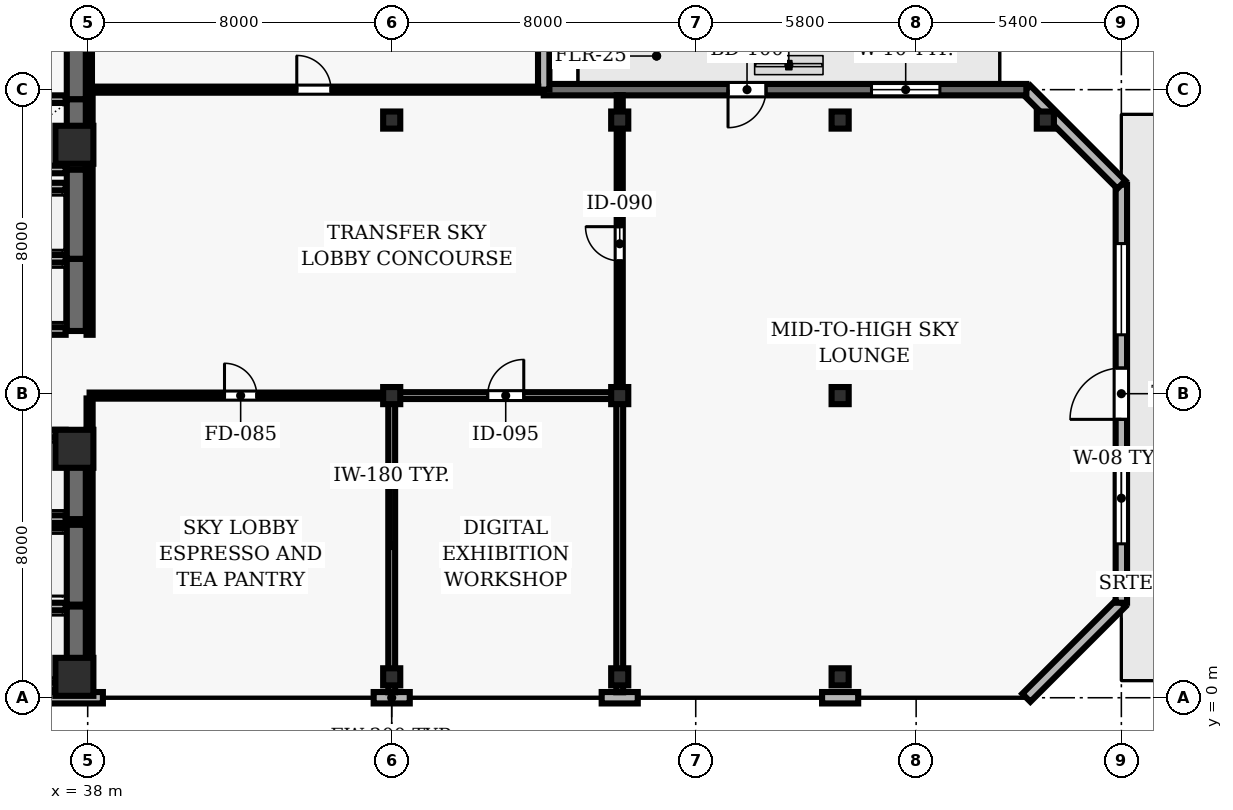
"""IFC4 building model, lengths in metres.
Left out: names, types, materials, properties, quantities, classifications, styles, units other than length and angle.
Written with IfcOpenShell. Run it as: python <this file> out.ifc"""

import sys

from ifc_helpers import new_model, si_unit, direction, frame, frame_2d, origin, origin_2d, place, context, subcontext, project, spatial, rectangle, hollow_rectangle, extrude, element, fill, save


model = new_model("IFC4")
c1 = context("Model", 3, precision=1e-05, world=origin(), true_north=direction((0.0, 1.0)))
c2 = subcontext(c1, "Body", "Model", "MODEL_VIEW")
j1 = project(units=[si_unit("LENGTHUNIT", "METRE"), si_unit("PLANEANGLEUNIT", "RADIAN")], contexts=[c1])
p1 = place(None, origin())
s1 = spatial("IfcSite", under=j1, at=p1, CompositionType="ELEMENT")
p2 = place(p1, origin())
s2 = spatial("IfcBuilding", under=s1, at=p2, CompositionType="ELEMENT")
p3 = place(p2, frame((0.0, 0.0, 170.8)))
s3 = spatial("IfcBuildingStorey", under=s2, at=p3, CompositionType="ELEMENT", Elevation=170.8)
for number, where, z_axis, x_axis in (
    (1, (37.65, 0.55, 0.0), (0.0, 0.0, 1.0), (1.0, 0.0, 0.0)),
    (2, (37.65, 6.55, 0.0), (0.0, 0.0, 1.0), (1.0, 0.0, 0.0)),
    (3, (37.65, 14.55, 0.0), (0.0, 0.0, 1.0), (1.0, 0.0, 0.0)),
):
    element("IfcColumn", number, at=place(p3, frame(where, z_axis=z_axis, x_axis=x_axis)), inside=s3, PredefinedType="COLUMN", context=c2, shape_type="SweptSolid", body=[
        extrude(rectangle(XDim=1.0, YDim=1.0, at=origin_2d()), origin(), (0.0, 0.0, 1.0), 5.0),
    ])
for number, where, z_axis, x_axis in (
    (4, (46.0, 0.55, 0.0), (0.0, 0.0, 1.0), (1.0, 0.0, 0.0)),
    (5, (46.0, 7.95, 0.0), (0.0, 0.0, 1.0), (1.0, 0.0, 0.0)),
    (6, (46.0, 15.2, 0.0), (0.0, 0.0, 1.0), (1.0, 0.0, 0.0)),
    (7, (52.0, 0.55, 0.0), (0.0, 0.0, 1.0), (1.0, 0.0, 0.0)),
    (8, (52.0, 7.95, 0.0), (0.0, 0.0, 1.0), (1.0, 0.0, 0.0)),
    (9, (52.0, 15.2, 0.0), (0.0, 0.0, 1.0), (1.0, 0.0, 0.0)),
    (10, (57.8, 0.55, 0.0), (0.0, 0.0, 1.0), (1.0, 0.0, 0.0)),
    (11, (57.8, 7.95, 0.0), (0.0, 0.0, 1.0), (1.0, 0.0, 0.0)),
    (12, (57.8, 15.2, 0.0), (0.0, 0.0, 1.0), (1.0, 0.0, 0.0)),
    (13, (63.2, 15.2, 0.0), (0.0, 0.0, 1.0), (1.0, 0.0, 0.0)),
):
    element("IfcColumn", number, at=place(p3, frame(where, z_axis=z_axis, x_axis=x_axis)), inside=s3, PredefinedType="COLUMN", context=c2, shape_type="SweptSolid", body=[
        extrude(hollow_rectangle(XDim=0.45, YDim=0.45, WallThickness=0.02, at=origin_2d()), origin(), (0.0, 0.0, 1.0), 5.0),
    ])
p4 = place(p3, frame((31.0, 0.0, 0.0), z_axis=(0.0, 0.0, 1.0), x_axis=(1.0, 0.0, 0.0)))
e14 = element("IfcWall", 14, at=p4, inside=s3, PredefinedType="SOLIDWALL", context=c2, shape_type="SweptSolid", body=[
    extrude(rectangle(XDim=7.4, YDim=0.3, at=frame_2d((3.7, 0.0))), origin(), (0.0, 0.0, 1.0), 4.79),
])
for number, where, z_axis, x_axis in (
    (15, (45.525, 0.0, 0.0), (0.0, 0.0, 1.0), (1.0, 0.0, 0.0)),
    (16, (51.525, 0.0, 0.0), (0.0, 0.0, 1.0), (1.0, 0.0, 0.0)),
):
    element("IfcWall", number, at=place(p3, frame(where, z_axis=z_axis, x_axis=x_axis)), inside=s3, PredefinedType="SOLIDWALL", context=c2, shape_type="SweptSolid", body=[
        extrude(rectangle(XDim=0.95, YDim=0.3, at=frame_2d((0.475, 0.0))), origin(), (0.0, 0.0, 1.0), 4.79),
    ])
p5 = place(p3, frame((57.325, 0.0, 0.0), z_axis=(0.0, 0.0, 1.0), x_axis=(1.0, 0.0, 0.0)))
e17 = element("IfcWall", 17, at=p5, inside=s3, PredefinedType="SOLIDWALL", context=c2, shape_type="SweptSolid", body=[
    extrude(rectangle(XDim=0.95, YDim=0.3, at=frame_2d((0.475, 0.0))), origin(), (0.0, 0.0, 1.0), 4.79),
])
p6 = place(p3, frame((62.7, 0.0, 0.0), z_axis=(0.0, 0.0, 1.0), x_axis=(0.707106781187, 0.707106781187, 0.0)))
e18 = element("IfcWall", 18, at=p6, inside=s3, PredefinedType="SOLIDWALL", context=c2, shape_type="SweptSolid", body=[
    extrude(rectangle(XDim=3.536, YDim=0.3, at=frame_2d((1.768, 0.0))), origin(), (0.0, 0.0, 1.0), 4.79),
])
p7 = place(p3, frame((65.2, 2.5, 0.0), z_axis=(0.0, 0.0, 1.0), x_axis=(0.0, 1.0, 0.0)))
e19 = element("IfcWall", 19, at=p7, inside=s3, PredefinedType="SOLIDWALL", context=c2, shape_type="SweptSolid", body=[
    extrude(rectangle(XDim=11.0, YDim=0.3, at=frame_2d((5.5, 0.0))), origin(), (0.0, 0.0, 1.0), 4.79),
])
p8 = place(p7, frame((4.825, 0.0, 0.0)))
e20 = element("IfcOpeningElement", 20, at=p8, cuts=e19, PredefinedType="OPENING", context=c2, shape_type="SweptSolid", body=[
    extrude(rectangle(XDim=1.35, YDim=2.2, at=frame_2d((0.675, 1.1))), frame((0.0, 0.16, 0.0), z_axis=(0.0, -1.0, 0.0), x_axis=(1.0, 0.0, 0.0)), (0.0, 0.0, 1.0), 0.32),
])
p9 = place(p7, frame((1.55, 0.0, 0.9)))
e21 = element("IfcOpeningElement", 21, at=p9, cuts=e19, PredefinedType="OPENING", context=c2, shape_type="SweptSolid", body=[
    extrude(rectangle(XDim=2.4, YDim=1.8, at=frame_2d((1.2, 0.9))), frame((0.0, 0.16, 0.0), z_axis=(0.0, -1.0, 0.0), x_axis=(1.0, 0.0, 0.0)), (0.0, 0.0, 1.0), 0.32),
])
p10 = place(p7, frame((7.05, 0.0, 0.9)))
e22 = element("IfcOpeningElement", 22, at=p10, cuts=e19, PredefinedType="OPENING", context=c2, shape_type="SweptSolid", body=[
    extrude(rectangle(XDim=2.4, YDim=1.8, at=frame_2d((1.2, 0.9))), frame((0.0, 0.16, 0.0), z_axis=(0.0, -1.0, 0.0), x_axis=(1.0, 0.0, 0.0)), (0.0, 0.0, 1.0), 0.32),
])
p11 = place(p3, frame((65.2, 13.5, 0.0), z_axis=(0.0, 0.0, 1.0), x_axis=(-0.707106781187, 0.707106781187, 0.0)))
e23 = element("IfcWall", 23, at=p11, inside=s3, PredefinedType="SOLIDWALL", context=c2, shape_type="SweptSolid", body=[
    extrude(rectangle(XDim=3.536, YDim=0.3, at=frame_2d((1.768, 0.0))), origin(), (0.0, 0.0, 1.0), 4.79),
])
p12 = place(p3, frame((62.7, 16.0, 0.0), z_axis=(0.0, 0.0, 1.0), x_axis=(-1.0, 0.0, 0.0)))
e24 = element("IfcWall", 24, at=p12, inside=s3, PredefinedType="SOLIDWALL", context=c2, shape_type="SweptSolid", body=[
    extrude(rectangle(XDim=12.7, YDim=0.3, at=frame_2d((6.35, 0.0))), origin(), (0.0, 0.0, 1.0), 4.79),
])
p13 = place(p12, frame((6.85, 0.0, 0.0)))
e25 = element("IfcOpeningElement", 25, at=p13, cuts=e24, PredefinedType="OPENING", context=c2, shape_type="SweptSolid", body=[
    extrude(rectangle(XDim=1.0, YDim=2.2, at=frame_2d((0.5, 1.1))), frame((0.0, 0.16, 0.0), z_axis=(0.0, -1.0, 0.0), x_axis=(1.0, 0.0, 0.0)), (0.0, 0.0, 1.0), 0.32),
])
p14 = place(p12, frame((2.275, 0.0, 0.9)))
e26 = element("IfcOpeningElement", 26, at=p14, cuts=e24, PredefinedType="OPENING", context=c2, shape_type="SweptSolid", body=[
    extrude(rectangle(XDim=1.8, YDim=2.2, at=frame_2d((0.9, 1.1))), frame((0.0, 0.16, 0.0), z_axis=(0.0, -1.0, 0.0), x_axis=(1.0, 0.0, 0.0)), (0.0, 0.0, 1.0), 0.32),
])
p15 = place(p3, frame((50.0, 16.0, 0.0), z_axis=(0.0, 0.0, 1.0), x_axis=(0.0, 1.0, 0.0)))
e27 = element("IfcWall", 27, at=p15, inside=s3, PredefinedType="SOLIDWALL", context=c2, shape_type="SweptSolid", body=[
    extrude(rectangle(XDim=7.8, YDim=0.3, at=frame_2d((3.9, 0.0))), origin(), (0.0, 0.0, 1.0), 4.79),
])
p16 = place(p15, frame((2.7, 0.0, 0.9)))
e28 = element("IfcOpeningElement", 28, at=p16, cuts=e27, PredefinedType="OPENING", context=c2, shape_type="SweptSolid", body=[
    extrude(rectangle(XDim=2.4, YDim=2.2, at=frame_2d((1.2, 1.1))), frame((0.0, 0.16, 0.0), z_axis=(0.0, -1.0, 0.0), x_axis=(1.0, 0.0, 0.0)), (0.0, 0.0, 1.0), 0.32),
])
p17 = place(p3, frame((37.7, 0.3, 0.0), z_axis=(0.0, 0.0, 1.0), x_axis=(0.0, 1.0, 0.0)))
e29 = element("IfcWall", 29, at=p17, inside=s3, PredefinedType="SHEAR", context=c2, shape_type="SweptSolid", body=[
    extrude(rectangle(XDim=2.1, YDim=0.5, at=frame_2d((1.05, 0.0))), origin(), (0.0, 0.0, 1.0), 4.79),
])
for number, where, z_axis, x_axis in (
    (30, (35.28, 0.3, 0.0), (0.0, 0.0, 1.0), (1.0, 0.0, 0.0)),
    (31, (37.42, 2.4, 0.0), (0.0, 0.0, 1.0), (-1.0, 0.0, 0.0)),
):
    element("IfcWall", number, at=place(p3, frame(where, z_axis=z_axis, x_axis=x_axis)), inside=s3, PredefinedType="SOLIDWALL", context=c2, shape_type="SweptSolid", body=[
        extrude(rectangle(XDim=2.14, YDim=0.2, at=frame_2d((1.07, 0.0))), origin(), (0.0, 0.0, 1.0), 4.79),
    ])
p18 = place(p3, frame((37.7, 2.45, 0.0), z_axis=(0.0, 0.0, 1.0), x_axis=(0.0, 1.0, 0.0)))
e32 = element("IfcWall", 32, at=p18, inside=s3, PredefinedType="SHEAR", context=c2, shape_type="SweptSolid", body=[
    extrude(rectangle(XDim=2.1, YDim=0.5, at=frame_2d((1.05, 0.0))), origin(), (0.0, 0.0, 1.0), 4.79),
])
p19 = place(p3, frame((37.42, 4.55, 0.0), z_axis=(0.0, 0.0, 1.0), x_axis=(-1.0, 0.0, 0.0)))
e33 = element("IfcWall", 33, at=p19, inside=s3, PredefinedType="SOLIDWALL", context=c2, shape_type="SweptSolid", body=[
    extrude(rectangle(XDim=2.14, YDim=0.2, at=frame_2d((1.07, 0.0))), origin(), (0.0, 0.0, 1.0), 4.79),
])
p20 = place(p3, frame((37.7, 4.7, 0.0), z_axis=(0.0, 0.0, 1.0), x_axis=(0.0, 1.0, 0.0)))
e34 = element("IfcWall", 34, at=p20, inside=s3, PredefinedType="SHEAR", context=c2, shape_type="SweptSolid", body=[
    extrude(rectangle(XDim=2.25, YDim=0.5, at=frame_2d((1.125, 0.0))), origin(), (0.0, 0.0, 1.0), 4.79),
])
for number, where, z_axis, x_axis in (
    (35, (35.28, 4.7, 0.0), (0.0, 0.0, 1.0), (1.0, 0.0, 0.0)),
    (36, (37.42, 6.95, 0.0), (0.0, 0.0, 1.0), (-1.0, 0.0, 0.0)),
):
    element("IfcWall", number, at=place(p3, frame(where, z_axis=z_axis, x_axis=x_axis)), inside=s3, PredefinedType="SOLIDWALL", context=c2, shape_type="SweptSolid", body=[
        extrude(rectangle(XDim=2.14, YDim=0.2, at=frame_2d((1.07, 0.0))), origin(), (0.0, 0.0, 1.0), 4.79),
    ])
p21 = place(p3, frame((37.7, 9.65, 0.0), z_axis=(0.0, 0.0, 1.0), x_axis=(0.0, 1.0, 0.0)))
e37 = element("IfcWall", 37, at=p21, inside=s3, PredefinedType="SHEAR", context=c2, shape_type="SweptSolid", body=[
    extrude(rectangle(XDim=1.9, YDim=0.5, at=frame_2d((0.95, 0.0))), origin(), (0.0, 0.0, 1.0), 4.79),
])
for number, where, z_axis, x_axis in (
    (38, (35.28, 9.65, 0.0), (0.0, 0.0, 1.0), (1.0, 0.0, 0.0)),
    (39, (37.42, 11.55, 0.0), (0.0, 0.0, 1.0), (-1.0, 0.0, 0.0)),
):
    element("IfcWall", number, at=place(p3, frame(where, z_axis=z_axis, x_axis=x_axis)), inside=s3, PredefinedType="SOLIDWALL", context=c2, shape_type="SweptSolid", body=[
        extrude(rectangle(XDim=2.14, YDim=0.2, at=frame_2d((1.07, 0.0))), origin(), (0.0, 0.0, 1.0), 4.79),
    ])
p22 = place(p3, frame((37.7, 11.55, 0.0), z_axis=(0.0, 0.0, 1.0), x_axis=(0.0, 1.0, 0.0)))
e40 = element("IfcWall", 40, at=p22, inside=s3, PredefinedType="SHEAR", context=c2, shape_type="SweptSolid", body=[
    extrude(rectangle(XDim=2.35, YDim=0.5, at=frame_2d((1.175, 0.0))), origin(), (0.0, 0.0, 1.0), 4.79),
])
p23 = place(p3, frame((37.42, 13.45, 0.0), z_axis=(0.0, 0.0, 1.0), x_axis=(-1.0, 0.0, 0.0)))
e41 = element("IfcWall", 41, at=p23, inside=s3, PredefinedType="SOLIDWALL", context=c2, shape_type="SweptSolid", body=[
    extrude(rectangle(XDim=2.14, YDim=0.2, at=frame_2d((1.07, 0.0))), origin(), (0.0, 0.0, 1.0), 4.79),
])
p24 = place(p3, frame((37.7, 13.9, 0.0), z_axis=(0.0, 0.0, 1.0), x_axis=(0.0, 1.0, 0.0)))
e42 = element("IfcWall", 42, at=p24, inside=s3, PredefinedType="SHEAR", context=c2, shape_type="SweptSolid", body=[
    extrude(rectangle(XDim=1.85, YDim=0.5, at=frame_2d((0.925, 0.0))), origin(), (0.0, 0.0, 1.0), 4.79),
])
for number, where, z_axis, x_axis in (
    (43, (35.28, 13.9, 0.0), (0.0, 0.0, 1.0), (1.0, 0.0, 0.0)),
    (44, (37.42, 15.75, 0.0), (0.0, 0.0, 1.0), (-1.0, 0.0, 0.0)),
):
    element("IfcWall", number, at=place(p3, frame(where, z_axis=z_axis, x_axis=x_axis)), inside=s3, PredefinedType="SOLIDWALL", context=c2, shape_type="SweptSolid", body=[
        extrude(rectangle(XDim=2.14, YDim=0.2, at=frame_2d((1.07, 0.0))), origin(), (0.0, 0.0, 1.0), 4.79),
    ])
p25 = place(p3, frame((37.7, 15.75, 0.0), z_axis=(0.0, 0.0, 1.0), x_axis=(0.0, 1.0, 0.0)))
e45 = element("IfcWall", 45, at=p25, inside=s3, PredefinedType="SHEAR", context=c2, shape_type="SweptSolid", body=[
    extrude(rectangle(XDim=1.85, YDim=0.5, at=frame_2d((0.925, 0.0))), origin(), (0.0, 0.0, 1.0), 4.79),
])
p26 = place(p3, frame((38.05, 7.95, 0.0), z_axis=(0.0, 0.0, 1.0), x_axis=(1.0, 0.0, 0.0)))
e46 = element("IfcWall", 46, at=p26, inside=s3, PredefinedType="PARTITIONING", context=c2, shape_type="SweptSolid", body=[
    extrude(rectangle(XDim=7.95, YDim=0.16, at=frame_2d((3.975, 0.0))), origin(), (0.0, 0.0, 1.0), 4.246),
])
p27 = place(p26, frame((3.55, 0.0, 0.0)))
e47 = element("IfcOpeningElement", 47, at=p27, cuts=e46, PredefinedType="OPENING", context=c2, shape_type="SweptSolid", body=[
    extrude(rectangle(XDim=0.85, YDim=2.1, at=frame_2d((0.425, 1.05))), frame((0.0, 0.09, 0.0), z_axis=(0.0, -1.0, 0.0), x_axis=(1.0, 0.0, 0.0)), (0.0, 0.0, 1.0), 0.18),
])
p28 = place(p3, frame((38.05, 16.0, 0.0), z_axis=(0.0, 0.0, 1.0), x_axis=(1.0, 0.0, 0.0)))
e48 = element("IfcWall", 48, at=p28, inside=s3, PredefinedType="PARTITIONING", context=c2, shape_type="SweptSolid", body=[
    extrude(rectangle(XDim=11.805, YDim=0.16, at=frame_2d((5.902, 0.0))), origin(), (0.0, 0.0, 1.0), 4.79),
])
p29 = place(p28, frame((5.452, 0.0, 0.0)))
e49 = element("IfcOpeningElement", 49, at=p29, cuts=e48, PredefinedType="OPENING", context=c2, shape_type="SweptSolid", body=[
    extrude(rectangle(XDim=0.9, YDim=2.1, at=frame_2d((0.45, 1.05))), frame((0.0, 0.09, 0.0), z_axis=(0.0, -1.0, 0.0), x_axis=(1.0, 0.0, 0.0)), (0.0, 0.0, 1.0), 0.18),
])
p30 = place(p3, frame((46.0, 7.95, 0.0), z_axis=(0.0, 0.0, 1.0), x_axis=(1.0, 0.0, 0.0)))
e50 = element("IfcWall", 50, at=p30, inside=s3, PredefinedType="PARTITIONING", context=c2, shape_type="SweptSolid", body=[
    extrude(rectangle(XDim=6.0, YDim=0.18, at=frame_2d((3.0, 0.0))), origin(), (0.0, 0.0, 1.0), 4.246),
])
p31 = place(p30, frame((2.525, 0.0, 0.0)))
e51 = element("IfcOpeningElement", 51, at=p31, cuts=e50, PredefinedType="OPENING", context=c2, shape_type="SweptSolid", body=[
    extrude(rectangle(XDim=0.95, YDim=2.1, at=frame_2d((0.475, 1.05))), frame((0.0, 0.1, 0.0), z_axis=(0.0, -1.0, 0.0), x_axis=(1.0, 0.0, 0.0)), (0.0, 0.0, 1.0), 0.2),
])
p32 = place(p3, frame((38.05, 7.05, 0.0), z_axis=(0.0, 0.0, 1.0), x_axis=(0.0, 1.0, 0.0)))
e52 = element("IfcWall", 52, at=p32, inside=s3, PredefinedType="PARTITIONING", context=c2, shape_type="SweptSolid", body=[
    extrude(rectangle(XDim=0.825, YDim=0.16, at=frame_2d((0.413, 0.0))), origin(), (0.0, 0.0, 1.0), 4.246),
])
p33 = place(p3, frame((38.05, 7.05, 0.0), z_axis=(0.0, 0.0, 1.0), x_axis=(0.0, -1.0, 0.0)))
e53 = element("IfcWall", 53, at=p33, inside=s3, PredefinedType="PARTITIONING", context=c2, shape_type="SweptSolid", body=[
    extrude(rectangle(XDim=6.905, YDim=0.16, at=frame_2d((3.453, 0.0))), origin(), (0.0, 0.0, 1.0), 4.246),
])
p34 = place(p3, frame((38.05, 15.925, 0.0), z_axis=(0.0, 0.0, 1.0), x_axis=(0.0, -1.0, 0.0)))
e54 = element("IfcWall", 54, at=p34, inside=s3, PredefinedType="PARTITIONING", context=c2, shape_type="SweptSolid", body=[
    extrude(rectangle(XDim=6.375, YDim=0.16, at=frame_2d((3.188, 0.0))), origin(), (0.0, 0.0, 1.0), 4.246),
])
p35 = place(p3, frame((38.05, 24.0, 0.0), z_axis=(0.0, 0.0, 1.0), x_axis=(0.0, -1.0, 0.0)))
e55 = element("IfcWall", 55, at=p35, inside=s3, PredefinedType="PARTITIONING", context=c2, shape_type="SweptSolid", body=[
    extrude(rectangle(XDim=7.925, YDim=0.125, at=frame_2d((3.962, 0.0))), origin(), (0.0, 0.0, 1.0), 4.246),
])
for number, where, z_axis, x_axis in (
    (56, (46.0, 0.145, 0.0), (0.0, 0.0, 1.0), (0.0, 1.0, 0.0)),
    (57, (52.0, 7.865, 0.0), (0.0, 0.0, 1.0), (0.0, -1.0, 0.0)),
):
    element("IfcWall", number, at=place(p3, frame(where, z_axis=z_axis, x_axis=x_axis)), inside=s3, PredefinedType="PARTITIONING", context=c2, shape_type="SweptSolid", body=[
        extrude(rectangle(XDim=7.72, YDim=0.18, at=frame_2d((3.86, 0.0))), origin(), (0.0, 0.0, 1.0), 4.246),
    ])
p36 = place(p3, frame((52.0, 8.035, 0.0), z_axis=(0.0, 0.0, 1.0), x_axis=(0.0, 1.0, 0.0)))
e58 = element("IfcWall", 58, at=p36, inside=s3, PredefinedType="PARTITIONING", context=c2, shape_type="SweptSolid", body=[
    extrude(rectangle(XDim=7.82, YDim=0.16, at=frame_2d((3.91, 0.0))), origin(), (0.0, 0.0, 1.0), 4.246),
])
p37 = place(p36, frame((3.46, 0.0, 0.0)))
e59 = element("IfcOpeningElement", 59, at=p37, cuts=e58, PredefinedType="OPENING", context=c2, shape_type="SweptSolid", body=[
    extrude(rectangle(XDim=0.9, YDim=2.1, at=frame_2d((0.45, 1.05))), frame((0.0, 0.09, 0.0), z_axis=(0.0, -1.0, 0.0), x_axis=(1.0, 0.0, 0.0)), (0.0, 0.0, 1.0), 0.18),
])
p38 = place(p8, origin())
e60 = element("IfcDoor", 60, at=p38, inside=s3, OperationType="SINGLE_SWING_LEFT", PredefinedType="DOOR", context=c2, shape_type="SweptSolid", body=[
    extrude(rectangle(XDim=1.35, YDim=2.2, at=frame_2d((0.675, 1.1))), frame((0.0, 0.025, 0.0), z_axis=(0.0, -1.0, 0.0), x_axis=(1.0, 0.0, 0.0)), (0.0, 0.0, 1.0), 0.05),
])
fill(e20, e60)
p39 = place(p9, origin())
e61 = element("IfcWindow", 61, at=p39, inside=s3, PartitioningType="SINGLE_PANEL", PredefinedType="WINDOW", context=c2, shape_type="SweptSolid", body=[
    extrude(rectangle(XDim=2.4, YDim=1.8, at=frame_2d((1.2, 0.9))), frame((0.0, 0.03, 0.0), z_axis=(0.0, -1.0, 0.0), x_axis=(1.0, 0.0, 0.0)), (0.0, 0.0, 1.0), 0.06),
])
fill(e21, e61)
p40 = place(p10, origin())
e62 = element("IfcWindow", 62, at=p40, inside=s3, PartitioningType="SINGLE_PANEL", PredefinedType="WINDOW", context=c2, shape_type="SweptSolid", body=[
    extrude(rectangle(XDim=2.4, YDim=1.8, at=frame_2d((1.2, 0.9))), frame((0.0, 0.03, 0.0), z_axis=(0.0, -1.0, 0.0), x_axis=(1.0, 0.0, 0.0)), (0.0, 0.0, 1.0), 0.06),
])
fill(e22, e62)
p41 = place(p13, origin())
e63 = element("IfcDoor", 63, at=p41, inside=s3, OperationType="SINGLE_SWING_RIGHT", PredefinedType="DOOR", context=c2, shape_type="SweptSolid", body=[
    extrude(rectangle(XDim=1.0, YDim=2.2, at=frame_2d((0.5, 1.1))), frame((0.0, 0.025, 0.0), z_axis=(0.0, -1.0, 0.0), x_axis=(1.0, 0.0, 0.0)), (0.0, 0.0, 1.0), 0.05),
])
fill(e25, e63)
p42 = place(p14, origin())
e64 = element("IfcWindow", 64, at=p42, inside=s3, PartitioningType="SINGLE_PANEL", PredefinedType="WINDOW", context=c2, shape_type="SweptSolid", body=[
    extrude(rectangle(XDim=1.8, YDim=2.2, at=frame_2d((0.9, 1.1))), frame((0.0, 0.03, 0.0), z_axis=(0.0, -1.0, 0.0), x_axis=(1.0, 0.0, 0.0)), (0.0, 0.0, 1.0), 0.06),
])
fill(e26, e64)
p43 = place(p37, origin())
e65 = element("IfcDoor", 65, at=p43, inside=s3, OperationType="SINGLE_SWING_RIGHT", PredefinedType="DOOR", context=c2, shape_type="SweptSolid", body=[
    extrude(rectangle(XDim=0.9, YDim=2.1, at=frame_2d((0.45, 1.05))), frame((0.0, 0.025, 0.0), z_axis=(0.0, -1.0, 0.0), x_axis=(1.0, 0.0, 0.0)), (0.0, 0.0, 1.0), 0.05),
])
fill(e59, e65)
p44 = place(p27, origin())
e66 = element("IfcDoor", 66, at=p44, inside=s3, OperationType="SINGLE_SWING_LEFT", PredefinedType="DOOR", context=c2, shape_type="SweptSolid", body=[
    extrude(rectangle(XDim=0.85, YDim=2.1, at=frame_2d((0.425, 1.05))), frame((0.0, 0.025, 0.0), z_axis=(0.0, -1.0, 0.0), x_axis=(1.0, 0.0, 0.0)), (0.0, 0.0, 1.0), 0.05),
])
fill(e47, e66)
p45 = place(p31, origin())
e67 = element("IfcDoor", 67, at=p45, inside=s3, OperationType="SINGLE_SWING_RIGHT", PredefinedType="DOOR", context=c2, shape_type="SweptSolid", body=[
    extrude(rectangle(XDim=0.95, YDim=2.1, at=frame_2d((0.475, 1.05))), frame((0.0, 0.025, 0.0), z_axis=(0.0, -1.0, 0.0), x_axis=(1.0, 0.0, 0.0)), (0.0, 0.0, 1.0), 0.05),
])
fill(e51, e67)
p46 = place(p29, origin())
e68 = element("IfcDoor", 68, at=p46, inside=s3, OperationType="SINGLE_SWING_LEFT", PredefinedType="DOOR", context=c2, shape_type="SweptSolid", body=[
    extrude(rectangle(XDim=0.9, YDim=2.1, at=frame_2d((0.45, 1.05))), frame((0.0, 0.025, 0.0), z_axis=(0.0, -1.0, 0.0), x_axis=(1.0, 0.0, 0.0)), (0.0, 0.0, 1.0), 0.05),
])
fill(e49, e68)
save(model, sys.argv[1])
